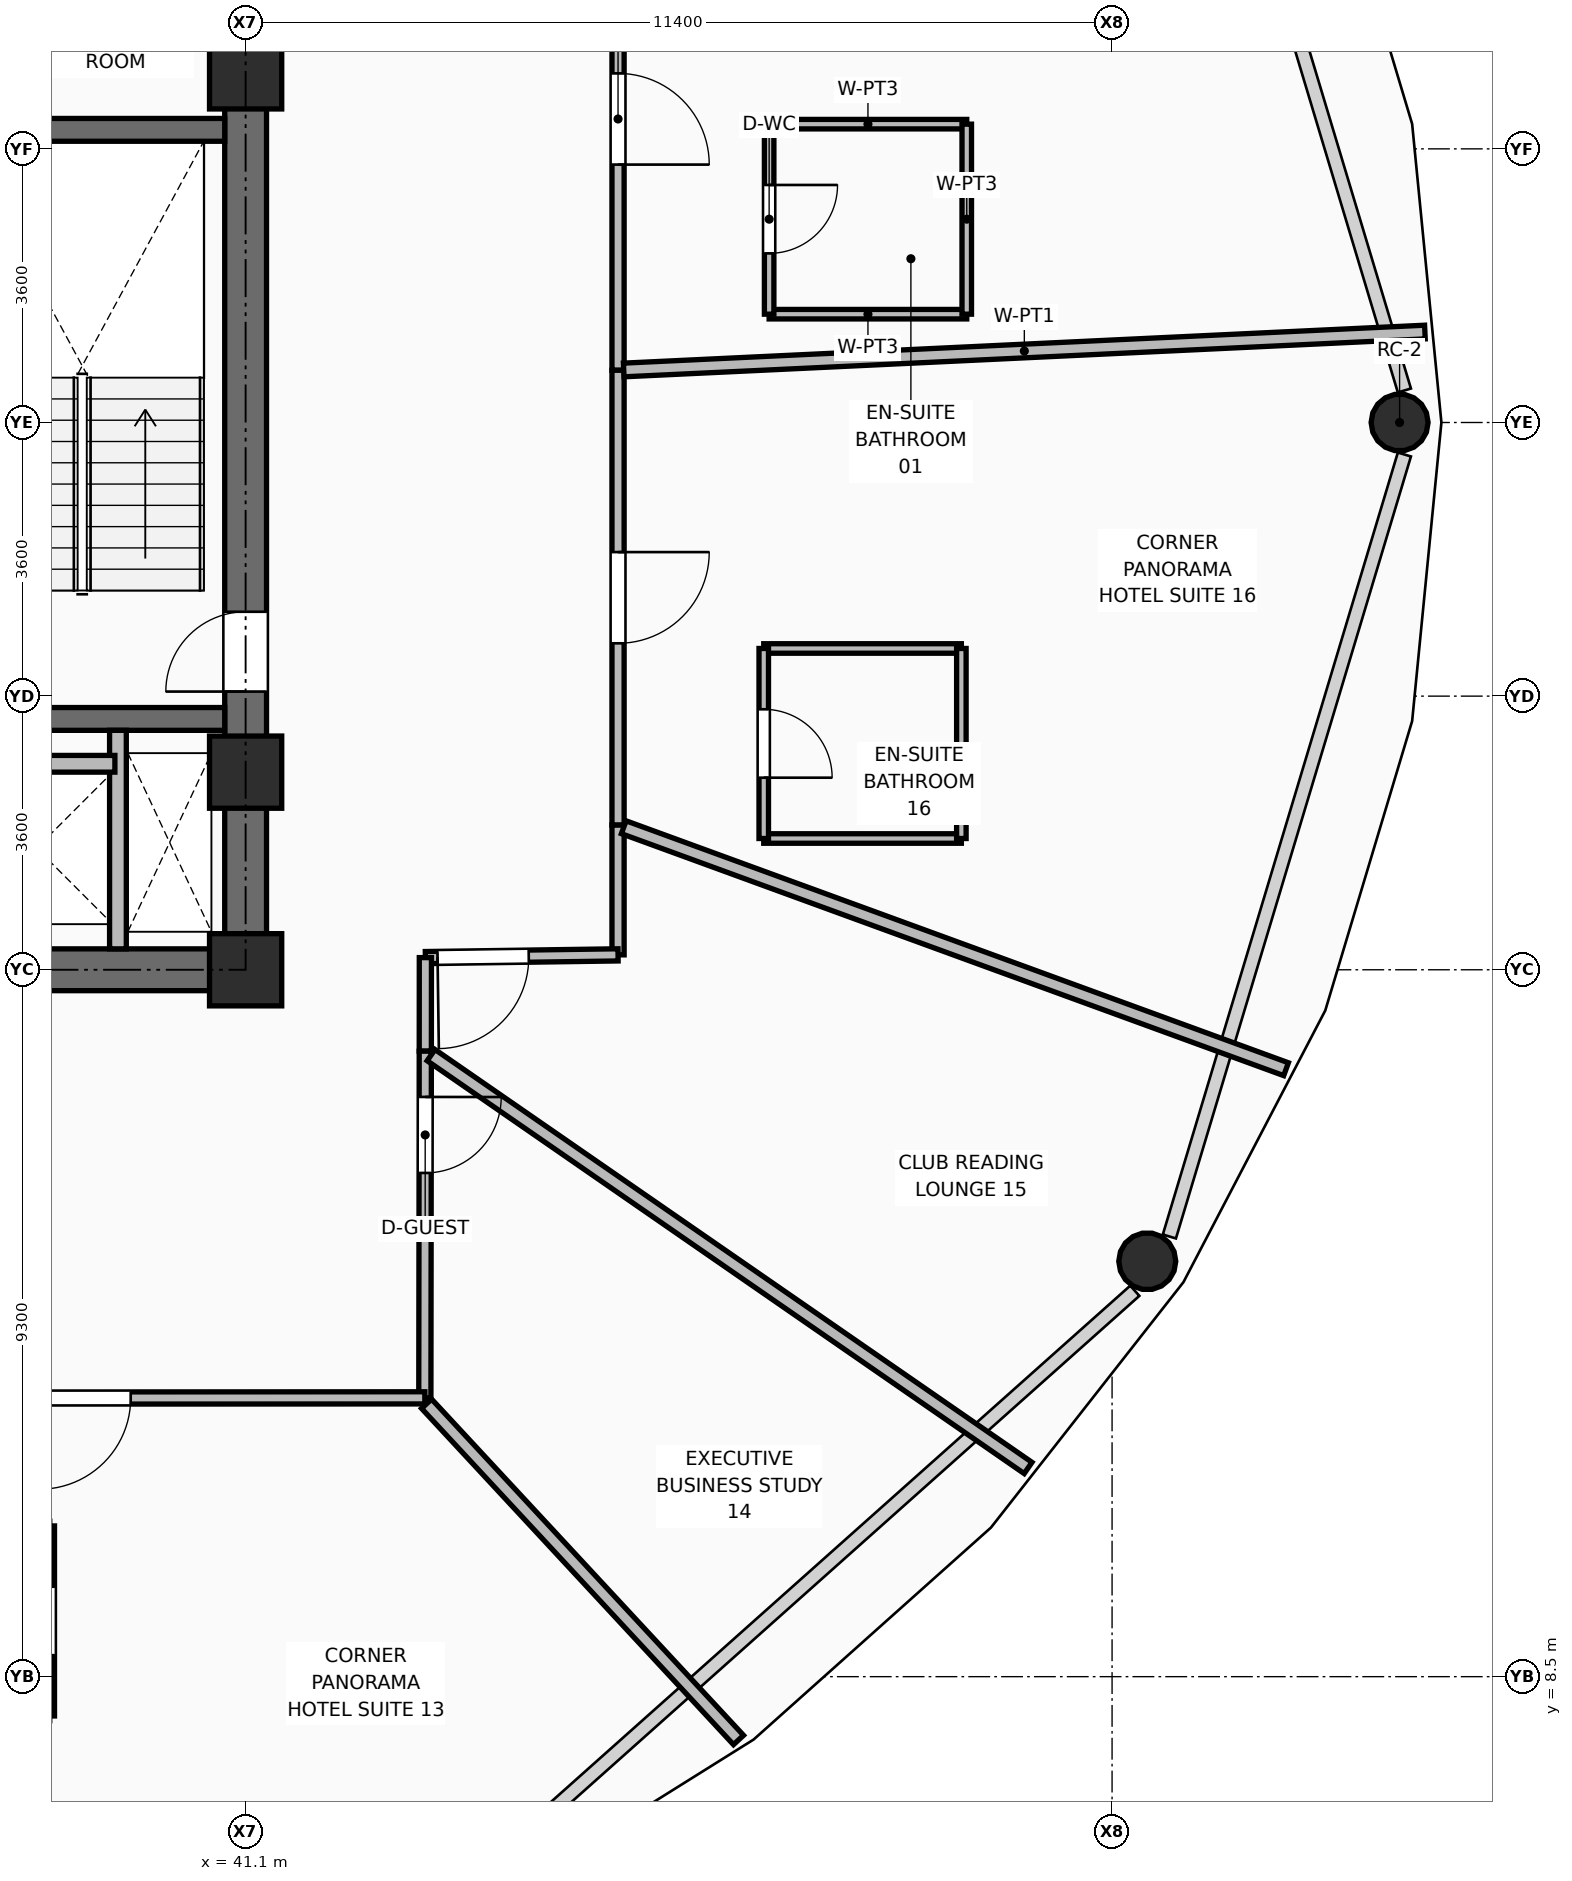
"""IFC4 building model, lengths in metres.
Left out: names, types, materials, properties, quantities, classifications, styles, units other than length and angle.
Written with IfcOpenShell. Run it as: python <this file> out.ifc"""

import sys

from ifc_helpers import new_model, si_unit, direction, frame, frame_2d, origin, origin_2d, place, context, subcontext, project, spatial, rectangle, hollow_circle, extrude, element, fill, save


model = new_model("IFC4")
c1 = context("Model", 3, precision=1e-05, world=origin(), true_north=direction((0.0, 1.0)))
c2 = subcontext(c1, "Body", "Model", "MODEL_VIEW")
j1 = project(units=[si_unit("LENGTHUNIT", "METRE"), si_unit("PLANEANGLEUNIT", "RADIAN")], contexts=[c1])
p1 = place(None, origin())
s1 = spatial("IfcSite", under=j1, at=p1, CompositionType="ELEMENT")
p2 = place(p1, origin())
s2 = spatial("IfcBuilding", under=s1, at=p2, CompositionType="ELEMENT")
p3 = place(p2, frame((0.0, 0.0, 149.7)))
s3 = spatial("IfcBuildingStorey", under=s2, at=p3, CompositionType="ELEMENT", Elevation=149.7)
for number, where, z_axis, x_axis in (
    (1, (41.1, 17.8, 0.0), (0.0, 0.0, 1.0), (1.0, 0.0, 0.0)),
    (2, (41.1, 20.4, 0.0), (0.0, 0.0, 1.0), (1.0, 0.0, 0.0)),
    (3, (41.1, 29.6, 0.0), (0.0, 0.0, 1.0), (1.0, 0.0, 0.0)),
):
    element("IfcColumn", number, at=place(p3, frame(where, z_axis=z_axis, x_axis=x_axis)), inside=s3, PredefinedType="COLUMN", context=c2, shape_type="SweptSolid", body=[
        extrude(rectangle(XDim=0.95, YDim=0.95, at=origin_2d()), origin(), (0.0, 0.0, 1.0), 3.75),
    ])
for number, where, z_axis, x_axis in (
    (4, (56.283, 25.0, 0.0), (0.0, 0.0, 1.0), (1.0, 0.0, 0.0)),
    (5, (52.963, 13.965, 0.0), (0.0, 0.0, 1.0), (1.0, 0.0, 0.0)),
):
    element("IfcColumn", number, at=place(p3, frame(where, z_axis=z_axis, x_axis=x_axis)), inside=s3, PredefinedType="COLUMN", context=c2, shape_type="SweptSolid", body=[
        extrude(hollow_circle(Radius=0.375, WallThickness=0.035, at=origin_2d()), origin(), (0.0, 0.0, 1.0), 3.57),
    ])
p4 = place(p3, frame((34.95, 17.8, 0.0), z_axis=(0.0, 0.0, 1.0), x_axis=(1.0, 0.0, 0.0)))
e6 = element("IfcWall", 6, at=p4, inside=s3, PredefinedType="SHEAR", context=c2, shape_type="SweptSolid", body=[
    extrude(rectangle(XDim=6.425, YDim=0.55, at=frame_2d((3.212, 0.0))), origin(), (0.0, 0.0, 1.0), 3.57),
])
p5 = place(p3, frame((41.1, 18.075, 0.0), z_axis=(0.0, 0.0, 1.0), x_axis=(0.0, 1.0, 0.0)))
e7 = element("IfcWall", 7, at=p5, inside=s3, PredefinedType="SHEAR", context=c2, shape_type="SweptSolid", body=[
    extrude(rectangle(XDim=14.1, YDim=0.55, at=frame_2d((7.05, 0.0))), origin(), (0.0, 0.0, 1.0), 3.57),
])
p6 = place(p5, frame((3.385, 0.0, 0.0)))
e8 = element("IfcOpeningElement", 8, at=p6, cuts=e7, PredefinedType="OPENING", context=c2, shape_type="SweptSolid", body=[
    extrude(rectangle(XDim=1.05, YDim=2.1, at=frame_2d((0.525, 1.05))), frame((0.0, 0.285, 0.0), z_axis=(0.0, -1.0, 0.0), x_axis=(1.0, 0.0, 0.0)), (0.0, 0.0, 1.0), 0.57),
])
for number, where, z_axis, x_axis in (
    (9, (37.21, 21.1, 0.0), (0.0, 0.0, 1.0), (1.0, 0.0, 0.0)),
    (10, (37.21, 28.85, 0.0), (0.0, 0.0, 1.0), (1.0, 0.0, 0.0)),
):
    element("IfcWall", number, at=place(p3, frame(where, z_axis=z_axis, x_axis=x_axis)), inside=s3, PredefinedType="SHEAR", context=c2, shape_type="SweptSolid", body=[
        extrude(rectangle(XDim=3.615, YDim=0.3, at=frame_2d((1.808, 0.0))), origin(), (0.0, 0.0, 1.0), 3.57),
    ])
p7 = place(p3, frame((39.42, 18.075, 0.0), z_axis=(0.0, 0.0, 1.0), x_axis=(0.0, 1.0, 0.0)))
e11 = element("IfcWall", 11, at=p7, inside=s3, PredefinedType="PARTITIONING", context=c2, shape_type="SweptSolid", body=[
    extrude(rectangle(XDim=2.875, YDim=0.22, at=frame_2d((1.438, 0.0))), origin(), (0.0, 0.0, 1.0), 3.55),
])
p8 = place(p3, frame((37.14, 20.51, 0.0), z_axis=(0.0, 0.0, 1.0), x_axis=(1.0, 0.0, 0.0)))
e12 = element("IfcWall", 12, at=p8, inside=s3, PredefinedType="PARTITIONING", context=c2, shape_type="SweptSolid", body=[
    extrude(rectangle(XDim=2.24, YDim=0.22, at=frame_2d((1.12, 0.0))), origin(), (0.0, 0.0, 1.0), 3.55),
])
p9 = place(p3, frame((46.0, 32.0, 0.0), z_axis=(0.0, 0.0, 1.0), x_axis=(0.0, -1.0, 0.0)))
e13 = element("IfcWall", 13, at=p9, inside=s3, PredefinedType="PARTITIONING", context=c2, shape_type="SweptSolid", body=[
    extrude(rectangle(XDim=6.313, YDim=0.16, at=frame_2d((3.156, 0.0))), origin(), (0.0, 0.0, 1.0), 3.55),
])
p10 = place(p9, frame((2.407, 0.0, 0.0)))
e14 = element("IfcOpeningElement", 14, at=p10, cuts=e13, PredefinedType="OPENING", context=c2, shape_type="SweptSolid", body=[
    extrude(rectangle(XDim=1.2, YDim=2.1, at=frame_2d((0.6, 1.05))), frame((0.0, 0.09, 0.0), z_axis=(0.0, -1.0, 0.0), x_axis=(1.0, 0.0, 0.0)), (0.0, 0.0, 1.0), 0.18),
])
p11 = place(p3, frame((46.0, 25.687, 0.0), z_axis=(0.0, 0.0, 1.0), x_axis=(0.0, -1.0, 0.0)))
e15 = element("IfcWall", 15, at=p11, inside=s3, PredefinedType="PARTITIONING", context=c2, shape_type="SweptSolid", body=[
    extrude(rectangle(XDim=5.984, YDim=0.16, at=frame_2d((2.992, 0.0))), origin(), (0.0, 0.0, 1.0), 3.006),
])
p12 = place(p11, frame((2.392, 0.0, 0.0)))
e16 = element("IfcOpeningElement", 16, at=p12, cuts=e15, PredefinedType="OPENING", context=c2, shape_type="SweptSolid", body=[
    extrude(rectangle(XDim=1.2, YDim=2.1, at=frame_2d((0.6, 1.05))), frame((0.0, 0.09, 0.0), z_axis=(0.0, -1.0, 0.0), x_axis=(1.0, 0.0, 0.0)), (0.0, 0.0, 1.0), 0.18),
])
p13 = place(p3, frame((46.0, 19.703, 0.0), z_axis=(0.0, 0.0, 1.0), x_axis=(0.0, -1.0, 0.0)))
e17 = element("IfcWall", 17, at=p13, inside=s3, PredefinedType="PARTITIONING", context=c2, shape_type="SweptSolid", body=[
    extrude(rectangle(XDim=1.707, YDim=0.16, at=frame_2d((0.854, 0.0))), origin(), (0.0, 0.0, 1.0), 3.55),
])
p14 = place(p3, frame((46.0, 17.996, 0.0), z_axis=(0.0, 0.0, 1.0), x_axis=(-0.999898426234, -0.014252621312, 0.0)))
e18 = element("IfcWall", 18, at=p14, inside=s3, PredefinedType="PARTITIONING", context=c2, shape_type="SweptSolid", body=[
    extrude(rectangle(XDim=2.535, YDim=0.16, at=frame_2d((1.268, 0.0))), origin(), (0.0, 0.0, 1.0), 3.55),
])
p15 = place(p14, frame((1.175, 0.0, 0.0)))
e19 = element("IfcOpeningElement", 19, at=p15, cuts=e18, PredefinedType="OPENING", context=c2, shape_type="SweptSolid", body=[
    extrude(rectangle(XDim=1.2, YDim=2.1, at=frame_2d((0.6, 1.05))), frame((0.0, 0.09, 0.0), z_axis=(0.0, -1.0, 0.0), x_axis=(1.0, 0.0, 0.0)), (0.0, 0.0, 1.0), 0.18),
])
p16 = place(p3, frame((43.465, 17.96, 0.0), z_axis=(0.0, 0.0, 1.0), x_axis=(-0.000793335728, -0.999999685309, 0.0)))
e20 = element("IfcWall", 20, at=p16, inside=s3, PredefinedType="PARTITIONING", context=c2, shape_type="SweptSolid", body=[
    extrude(rectangle(XDim=1.231, YDim=0.16, at=frame_2d((0.615, 0.0))), origin(), (0.0, 0.0, 1.0), 3.006),
])
p17 = place(p3, frame((43.464, 16.729, 0.0), z_axis=(0.0, 0.0, 1.0), x_axis=(-0.001338185291, -0.99999910463, 0.0)))
e21 = element("IfcWall", 21, at=p17, inside=s3, PredefinedType="PARTITIONING", context=c2, shape_type="SweptSolid", body=[
    extrude(rectangle(XDim=4.561, YDim=0.16, at=frame_2d((2.281, 0.0))), origin(), (0.0, 0.0, 1.0), 3.55),
])
p18 = place(p17, frame((0.602, 0.0, 0.0)))
e22 = element("IfcOpeningElement", 22, at=p18, cuts=e21, PredefinedType="OPENING", context=c2, shape_type="SweptSolid", body=[
    extrude(rectangle(XDim=1.0, YDim=2.1, at=frame_2d((0.5, 1.05))), frame((0.0, 0.09, 0.0), z_axis=(0.0, -1.0, 0.0), x_axis=(1.0, 0.0, 0.0)), (0.0, 0.0, 1.0), 0.18),
])
p19 = place(p3, frame((43.458, 12.168, 0.0), z_axis=(0.0, 0.0, 1.0), x_axis=(-0.99999990454, -0.000436943538, 0.0)))
e23 = element("IfcWall", 23, at=p19, inside=s3, PredefinedType="PARTITIONING", context=c2, shape_type="SweptSolid", body=[
    extrude(rectangle(XDim=8.94, YDim=0.16, at=frame_2d((4.47, 0.0))), origin(), (0.0, 0.0, 1.0), 3.006),
])
p20 = place(p19, frame((3.87, 0.0, 0.0)))
e24 = element("IfcOpeningElement", 24, at=p20, cuts=e23, PredefinedType="OPENING", context=c2, shape_type="SweptSolid", body=[
    extrude(rectangle(XDim=1.2, YDim=2.1, at=frame_2d((0.6, 1.05))), frame((0.0, 0.09, 0.0), z_axis=(0.0, -1.0, 0.0), x_axis=(1.0, 0.0, 0.0)), (0.0, 0.0, 1.0), 0.18),
])
p21 = place(p3, frame((46.075, 25.691, 0.0), z_axis=(0.0, 0.0, 1.0), x_axis=(0.998881289469, 0.04728815443, 0.0)))
e25 = element("IfcWall", 25, at=p21, inside=s3, PredefinedType="PARTITIONING", context=c2, shape_type="SweptSolid", body=[
    extrude(rectangle(XDim=10.553, YDim=0.18, at=frame_2d((5.276, 0.0))), origin(), (0.0, 0.0, 1.0), 2.852),
])
p22 = place(p3, frame((43.481, 12.09, 0.0), z_axis=(0.0, 0.0, 1.0), x_axis=(0.680170141703, -0.73305428062, 0.0)))
e26 = element("IfcWall", 26, at=p22, inside=s3, PredefinedType="PARTITIONING", context=c2, shape_type="SweptSolid", body=[
    extrude(rectangle(XDim=6.034, YDim=0.18, at=frame_2d((3.017, 0.0))), origin(), (0.0, 0.0, 1.0), 2.852),
])
p23 = place(p3, frame((43.54, 16.677, 0.0), z_axis=(0.0, 0.0, 1.0), x_axis=(0.822542691302, -0.568703368186, 0.0)))
e27 = element("IfcWall", 27, at=p23, inside=s3, PredefinedType="PARTITIONING", context=c2, shape_type="SweptSolid", body=[
    extrude(rectangle(XDim=9.55, YDim=0.18, at=frame_2d((4.775, 0.0))), origin(), (0.0, 0.0, 1.0), 2.852),
])
p24 = place(p3, frame((46.075, 19.675, 0.0), z_axis=(0.0, 0.0, 1.0), x_axis=(0.939296078377, -0.343107675731, 0.0)))
e28 = element("IfcWall", 28, at=p24, inside=s3, PredefinedType="PARTITIONING", context=c2, shape_type="SweptSolid", body=[
    extrude(rectangle(XDim=9.277, YDim=0.18, at=frame_2d((4.639, 0.0))), origin(), (0.0, 0.0, 1.0), 2.852),
])
for number, where, z_axis, x_axis in (
    (29, (47.988, 26.425, 0.0), (0.0, 0.0, 1.0), (1.0, 0.0, 0.0)),
    (30, (47.988, 28.925, 0.0), (0.0, 0.0, 1.0), (1.0, 0.0, 0.0)),
):
    element("IfcWall", number, at=place(p3, frame(where, z_axis=z_axis, x_axis=x_axis)), inside=s3, PredefinedType="PARTITIONING", context=c2, shape_type="SweptSolid", body=[
        extrude(rectangle(XDim=2.6, YDim=0.125, at=frame_2d((1.3, 0.0))), origin(), (0.0, 0.0, 1.0), 3.55),
    ])
p25 = place(p3, frame((47.988, 26.425, 0.0), z_axis=(0.0, 0.0, 1.0), x_axis=(0.0, 1.0, 0.0)))
e31 = element("IfcWall", 31, at=p25, inside=s3, PredefinedType="PARTITIONING", context=c2, shape_type="SweptSolid", body=[
    extrude(rectangle(XDim=2.5, YDim=0.125, at=frame_2d((1.25, 0.0))), origin(), (0.0, 0.0, 1.0), 3.55),
])
p26 = place(p25, frame((0.8, 0.0, 0.0)))
e32 = element("IfcOpeningElement", 32, at=p26, cuts=e31, PredefinedType="OPENING", context=c2, shape_type="SweptSolid", body=[
    extrude(rectangle(XDim=0.9, YDim=2.1, at=frame_2d((0.45, 1.05))), frame((0.0, 0.073, 0.0), z_axis=(0.0, -1.0, 0.0), x_axis=(1.0, 0.0, 0.0)), (0.0, 0.0, 1.0), 0.145),
])
p27 = place(p3, frame((50.588, 26.425, 0.0), z_axis=(0.0, 0.0, 1.0), x_axis=(0.0, 1.0, 0.0)))
e33 = element("IfcWall", 33, at=p27, inside=s3, PredefinedType="PARTITIONING", context=c2, shape_type="SweptSolid", body=[
    extrude(rectangle(XDim=2.5, YDim=0.125, at=frame_2d((1.25, 0.0))), origin(), (0.0, 0.0, 1.0), 3.55),
])
p28 = place(p3, frame((38.523, 7.983, 0.0), z_axis=(0.0, 0.0, 1.0), x_axis=(0.0, 1.0, 0.0)))
e34 = element("IfcWall", 34, at=p28, inside=s3, PredefinedType="PARTITIONING", context=c2, shape_type="SweptSolid", body=[
    extrude(rectangle(XDim=2.5, YDim=0.125, at=frame_2d((1.25, 0.0))), origin(), (0.0, 0.0, 1.0), 3.55),
])
p29 = place(p28, frame((0.8, 0.0, 0.0)))
e35 = element("IfcOpeningElement", 35, at=p29, cuts=e34, PredefinedType="OPENING", context=c2, shape_type="SweptSolid", body=[
    extrude(rectangle(XDim=0.9, YDim=2.1, at=frame_2d((0.45, 1.05))), frame((0.0, 0.073, 0.0), z_axis=(0.0, -1.0, 0.0), x_axis=(1.0, 0.0, 0.0)), (0.0, 0.0, 1.0), 0.145),
])
for number, where, z_axis, x_axis in (
    (36, (47.917, 19.527, 0.0), (0.0, 0.0, 1.0), (1.0, 0.0, 0.0)),
    (37, (47.917, 22.027, 0.0), (0.0, 0.0, 1.0), (1.0, 0.0, 0.0)),
):
    element("IfcWall", number, at=place(p3, frame(where, z_axis=z_axis, x_axis=x_axis)), inside=s3, PredefinedType="PARTITIONING", context=c2, shape_type="SweptSolid", body=[
        extrude(rectangle(XDim=2.6, YDim=0.125, at=frame_2d((1.3, 0.0))), origin(), (0.0, 0.0, 1.0), 3.55),
    ])
p30 = place(p3, frame((47.917, 19.527, 0.0), z_axis=(0.0, 0.0, 1.0), x_axis=(0.0, 1.0, 0.0)))
e38 = element("IfcWall", 38, at=p30, inside=s3, PredefinedType="PARTITIONING", context=c2, shape_type="SweptSolid", body=[
    extrude(rectangle(XDim=2.5, YDim=0.125, at=frame_2d((1.25, 0.0))), origin(), (0.0, 0.0, 1.0), 3.55),
])
p31 = place(p30, frame((0.8, 0.0, 0.0)))
e39 = element("IfcOpeningElement", 39, at=p31, cuts=e38, PredefinedType="OPENING", context=c2, shape_type="SweptSolid", body=[
    extrude(rectangle(XDim=0.9, YDim=2.1, at=frame_2d((0.45, 1.05))), frame((0.0, 0.073, 0.0), z_axis=(0.0, -1.0, 0.0), x_axis=(1.0, 0.0, 0.0)), (0.0, 0.0, 1.0), 0.145),
])
p32 = place(p3, frame((50.517, 19.527, 0.0), z_axis=(0.0, 0.0, 1.0), x_axis=(0.0, 1.0, 0.0)))
e40 = element("IfcWall", 40, at=p32, inside=s3, PredefinedType="PARTITIONING", context=c2, shape_type="SweptSolid", body=[
    extrude(rectangle(XDim=2.5, YDim=0.125, at=frame_2d((1.25, 0.0))), origin(), (0.0, 0.0, 1.0), 3.55),
])
p33 = place(p6, origin())
e41 = element("IfcDoor", 41, at=p33, inside=s3, OperationType="SINGLE_SWING_LEFT", PredefinedType="DOOR", context=c2, shape_type="SweptSolid", body=[
    extrude(rectangle(XDim=1.05, YDim=2.1, at=frame_2d((0.525, 1.05))), frame((0.0, 0.025, 0.0), z_axis=(0.0, -1.0, 0.0), x_axis=(1.0, 0.0, 0.0)), (0.0, 0.0, 1.0), 0.05),
])
fill(e8, e41)
p34 = place(p26, frame((0.9, 0.0, 0.0), z_axis=(0.0, 0.0, 1.0), x_axis=(-1.0, 0.0, 0.0)))
e42 = element("IfcDoor", 42, at=p34, inside=s3, OperationType="SINGLE_SWING_LEFT", PredefinedType="DOOR", context=c2, shape_type="SweptSolid", body=[
    extrude(rectangle(XDim=0.9, YDim=2.1, at=frame_2d((0.45, 1.05))), frame((0.0, 0.025, 0.0), z_axis=(0.0, -1.0, 0.0), x_axis=(1.0, 0.0, 0.0)), (0.0, 0.0, 1.0), 0.05),
])
fill(e32, e42)
p35 = place(p10, origin())
e43 = element("IfcDoor", 43, at=p35, inside=s3, OperationType="SINGLE_SWING_RIGHT", PredefinedType="DOOR", context=c2, shape_type="SweptSolid", body=[
    extrude(rectangle(XDim=1.2, YDim=2.1, at=frame_2d((0.6, 1.05))), frame((0.0, 0.025, 0.0), z_axis=(0.0, -1.0, 0.0), x_axis=(1.0, 0.0, 0.0)), (0.0, 0.0, 1.0), 0.05),
])
fill(e14, e43)
p36 = place(p20, origin())
e44 = element("IfcDoor", 44, at=p36, inside=s3, OperationType="SINGLE_SWING_RIGHT", PredefinedType="DOOR", context=c2, shape_type="SweptSolid", body=[
    extrude(rectangle(XDim=1.2, YDim=2.1, at=frame_2d((0.6, 1.05))), frame((0.0, 0.025, 0.0), z_axis=(0.0, -1.0, 0.0), x_axis=(1.0, 0.0, 0.0)), (0.0, 0.0, 1.0), 0.05),
])
fill(e24, e44)
p37 = place(p18, origin())
e45 = element("IfcDoor", 45, at=p37, inside=s3, OperationType="SINGLE_SWING_LEFT", PredefinedType="DOOR", context=c2, shape_type="SweptSolid", body=[
    extrude(rectangle(XDim=1.0, YDim=2.1, at=frame_2d((0.5, 1.05))), frame((0.0, 0.025, 0.0), z_axis=(0.0, -1.0, 0.0), x_axis=(1.0, 0.0, 0.0)), (0.0, 0.0, 1.0), 0.05),
])
fill(e22, e45)
p38 = place(p15, origin())
e46 = element("IfcDoor", 46, at=p38, inside=s3, OperationType="SINGLE_SWING_RIGHT", PredefinedType="DOOR", context=c2, shape_type="SweptSolid", body=[
    extrude(rectangle(XDim=1.2, YDim=2.1, at=frame_2d((0.6, 1.05))), frame((0.0, 0.025, 0.0), z_axis=(0.0, -1.0, 0.0), x_axis=(1.0, 0.0, 0.0)), (0.0, 0.0, 1.0), 0.05),
])
fill(e19, e46)
p39 = place(p31, frame((0.9, 0.0, 0.0), z_axis=(0.0, 0.0, 1.0), x_axis=(-1.0, 0.0, 0.0)))
e47 = element("IfcDoor", 47, at=p39, inside=s3, OperationType="SINGLE_SWING_RIGHT", PredefinedType="DOOR", context=c2, shape_type="SweptSolid", body=[
    extrude(rectangle(XDim=0.9, YDim=2.1, at=frame_2d((0.45, 1.05))), frame((0.0, 0.025, 0.0), z_axis=(0.0, -1.0, 0.0), x_axis=(1.0, 0.0, 0.0)), (0.0, 0.0, 1.0), 0.05),
])
fill(e39, e47)
p40 = place(p12, origin())
e48 = element("IfcDoor", 48, at=p40, inside=s3, OperationType="SINGLE_SWING_LEFT", PredefinedType="DOOR", context=c2, shape_type="SweptSolid", body=[
    extrude(rectangle(XDim=1.2, YDim=2.1, at=frame_2d((0.6, 1.05))), frame((0.0, 0.025, 0.0), z_axis=(0.0, -1.0, 0.0), x_axis=(1.0, 0.0, 0.0)), (0.0, 0.0, 1.0), 0.05),
])
fill(e16, e48)
save(model, sys.argv[1])
